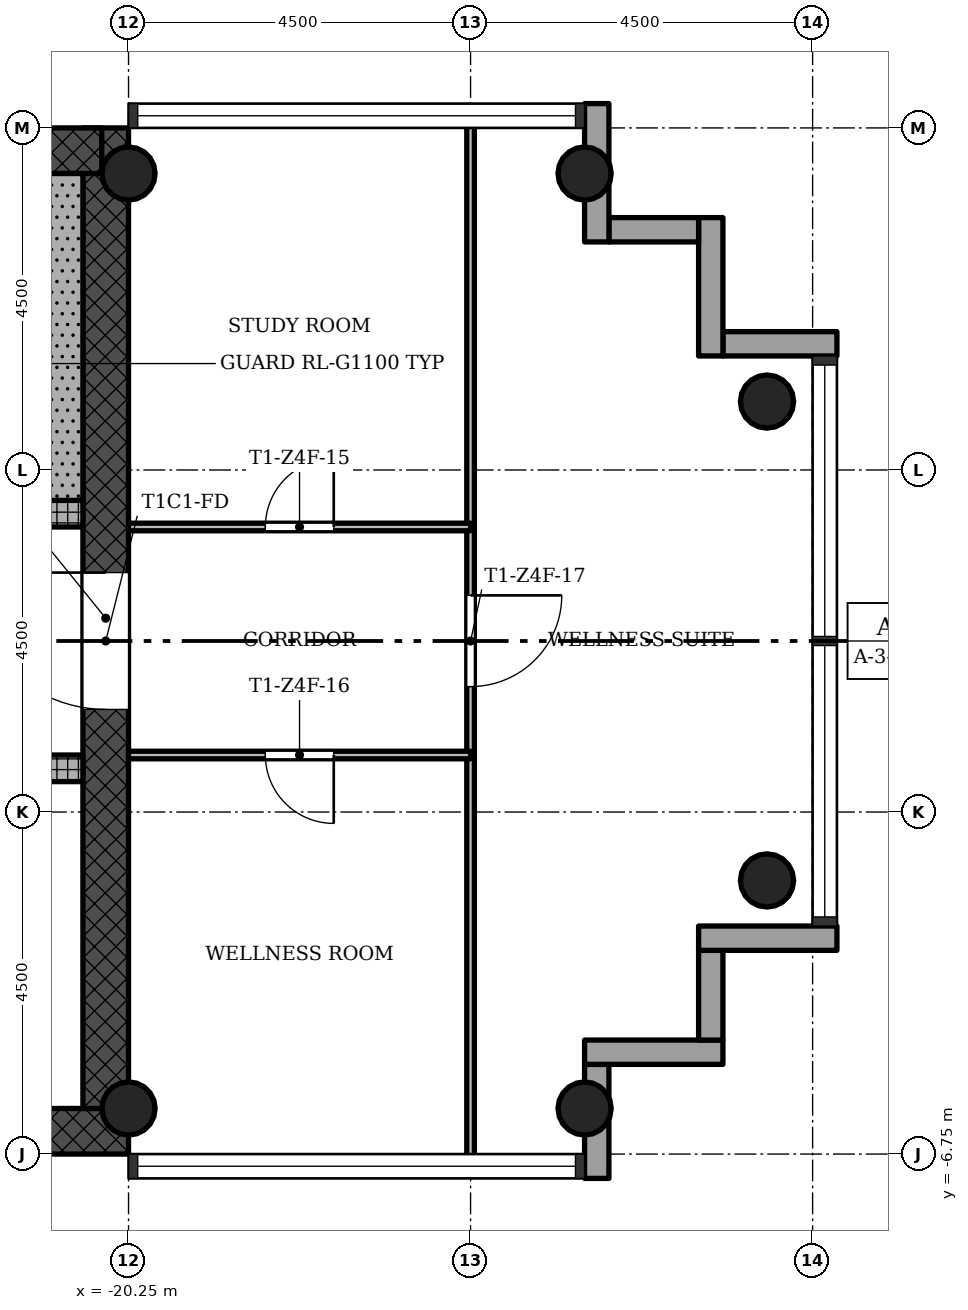
"""IFC4 building model, lengths in metres.
Left out: names, types, materials, properties, quantities, classifications, styles, units other than length and angle.
Written with IfcOpenShell. Run it as: python <this file> out.ifc"""

import sys

from ifc_helpers import new_model, si_unit, direction, frame, frame_2d, origin, origin_2d, place, context, subcontext, project, spatial, rectangle, hollow_circle, extrude, element, fill, save


model = new_model("IFC4")
c1 = context("Model", 3, precision=1e-05, world=origin(), true_north=direction((0.0, 1.0)))
c2 = subcontext(c1, "Body", "Model", "MODEL_VIEW")
j1 = project(units=[si_unit("LENGTHUNIT", "METRE"), si_unit("PLANEANGLEUNIT", "RADIAN")], contexts=[c1])
p1 = place(None, origin())
s1 = spatial("IfcSite", under=j1, at=p1, CompositionType="ELEMENT")
p2 = place(p1, origin())
s2 = spatial("IfcBuilding", under=s1, at=p2, CompositionType="ELEMENT")
p3 = place(p2, frame((0.0, 0.0, 219.8)))
s3 = spatial("IfcBuildingStorey", under=s2, at=p3, CompositionType="ELEMENT", Elevation=219.8)
p4 = place(p3, frame((-28.65, -6.45, 0.0), z_axis=(0.0, 0.0, 1.0), x_axis=(1.0, 0.0, 0.0)))
e1 = element("IfcWall", 1, at=p4, inside=s3, PredefinedType="SHEAR", context=c2, shape_type="SweptSolid", body=[
    extrude(rectangle(XDim=8.4, YDim=0.6, at=frame_2d((4.2, 0.0))), origin(), (0.0, 0.0, 1.0), 3.4),
])
p5 = place(p3, frame((-20.55, -6.15, 0.0), z_axis=(0.0, 0.0, 1.0), x_axis=(0.0, 1.0, 0.0)))
e2 = element("IfcWall", 2, at=p5, inside=s3, PredefinedType="SHEAR", context=c2, shape_type="SweptSolid", body=[
    extrude(rectangle(XDim=12.9, YDim=0.6, at=frame_2d((6.45, 0.0))), origin(), (0.0, 0.0, 1.0), 3.4),
])
p6 = place(p5, frame((5.25, 0.0, 0.0)))
e3 = element("IfcOpeningElement", 3, at=p6, cuts=e2, PredefinedType="OPENING", context=c2, shape_type="SweptSolid", body=[
    extrude(rectangle(XDim=1.8, YDim=2.1, at=frame_2d((0.9, 1.05))), frame((0.0, 0.31, 0.0), z_axis=(0.0, -1.0, 0.0), x_axis=(1.0, 0.0, 0.0)), (0.0, 0.0, 1.0), 0.62),
])
p7 = place(p3, frame((-20.602, 6.45, 0.0), z_axis=(0.0, 0.0, 1.0), x_axis=(-1.0, 0.0, 0.0)))
e4 = element("IfcWall", 4, at=p7, inside=s3, PredefinedType="SHEAR", context=c2, shape_type="SweptSolid", body=[
    extrude(rectangle(XDim=8.896, YDim=0.6, at=frame_2d((4.448, 0.0))), origin(), (0.0, 0.0, 1.0), 3.4),
])
p8 = place(p3, frame((-28.65, -1.675, 0.0), z_axis=(0.0, 0.0, 1.0), x_axis=(1.0, 0.0, 0.0)))
e5 = element("IfcWall", 5, at=p8, inside=s3, PredefinedType="SHEAR", context=c2, shape_type="SweptSolid", body=[
    extrude(rectangle(XDim=7.8, YDim=0.35, at=frame_2d((3.9, 0.0))), origin(), (0.0, 0.0, 1.0), 3.4),
])
p9 = place(p8, frame((1.15, 0.0, 0.0)))
e6 = element("IfcOpeningElement", 6, at=p9, cuts=e5, PredefinedType="OPENING", context=c2, shape_type="SweptSolid", body=[
    extrude(rectangle(XDim=1.1, YDim=2.1, at=frame_2d((0.55, 1.05))), frame((0.0, 0.185, 0.0), z_axis=(0.0, -1.0, 0.0), x_axis=(1.0, 0.0, 0.0)), (0.0, 0.0, 1.0), 0.37),
])
p10 = place(p8, frame((3.35, 0.0, 0.0)))
e7 = element("IfcOpeningElement", 7, at=p10, cuts=e5, PredefinedType="OPENING", context=c2, shape_type="SweptSolid", body=[
    extrude(rectangle(XDim=1.1, YDim=2.1, at=frame_2d((0.55, 1.05))), frame((0.0, 0.185, 0.0), z_axis=(0.0, -1.0, 0.0), x_axis=(1.0, 0.0, 0.0)), (0.0, 0.0, 1.0), 0.37),
])
p11 = place(p8, frame((5.55, 0.0, 0.0)))
e8 = element("IfcOpeningElement", 8, at=p11, cuts=e5, PredefinedType="OPENING", context=c2, shape_type="SweptSolid", body=[
    extrude(rectangle(XDim=1.1, YDim=2.1, at=frame_2d((0.55, 1.05))), frame((0.0, 0.185, 0.0), z_axis=(0.0, -1.0, 0.0), x_axis=(1.0, 0.0, 0.0)), (0.0, 0.0, 1.0), 0.37),
])
p12 = place(p3, frame((-28.65, 1.675, 0.0), z_axis=(0.0, 0.0, 1.0), x_axis=(1.0, 0.0, 0.0)))
e9 = element("IfcWall", 9, at=p12, inside=s3, PredefinedType="SHEAR", context=c2, shape_type="SweptSolid", body=[
    extrude(rectangle(XDim=7.8, YDim=0.35, at=frame_2d((3.9, 0.0))), origin(), (0.0, 0.0, 1.0), 3.4),
])
p13 = place(p12, frame((1.05, 0.0, 0.0)))
e10 = element("IfcOpeningElement", 10, at=p13, cuts=e9, PredefinedType="OPENING", context=c2, shape_type="SweptSolid", body=[
    extrude(rectangle(XDim=0.9, YDim=2.1, at=frame_2d((0.45, 1.05))), frame((0.0, 0.185, 0.0), z_axis=(0.0, -1.0, 0.0), x_axis=(1.0, 0.0, 0.0)), (0.0, 0.0, 1.0), 0.37),
])
for number, where, z_axis, x_axis in (
    (11, (-20.25, -6.15, 0.0), (0.0, 0.0, 1.0), (1.0, 0.0, 0.0)),
    (12, (-20.25, 6.15, 0.0), (0.0, 0.0, 1.0), (1.0, 0.0, 0.0)),
    (13, (-14.25, -6.15, 0.0), (0.0, 0.0, 1.0), (1.0, 0.0, 0.0)),
    (14, (-14.25, 6.15, 0.0), (0.0, 0.0, 1.0), (1.0, 0.0, 0.0)),
    (15, (-11.85, -3.15, 0.0), (0.0, 0.0, 1.0), (1.0, 0.0, 0.0)),
    (16, (-11.85, 3.15, 0.0), (0.0, 0.0, 1.0), (1.0, 0.0, 0.0)),
):
    element("IfcColumn", number, at=place(p3, frame(where, z_axis=z_axis, x_axis=x_axis)), inside=s3, PredefinedType="COLUMN", context=c2, shape_type="SweptSolid", body=[
        extrude(hollow_circle(Radius=0.35, WallThickness=0.025, at=origin_2d()), origin(), (0.0, 0.0, 1.0), 3.4),
    ])
p14 = place(p3, frame((-14.09, -7.07, -0.3), z_axis=(0.0, 0.0, 1.0), x_axis=(0.0, 1.0, 0.0)))
e17 = element("IfcWall", 17, at=p14, inside=s3, PredefinedType="STANDARD", context=c2, shape_type="SweptSolid", body=[
    extrude(rectangle(XDim=1.5, YDim=0.32, at=frame_2d((0.75, 0.0))), origin(), (0.0, 0.0, 1.0), 3.4),
])
p15 = place(p3, frame((-14.25, -5.41, -0.3), z_axis=(0.0, 0.0, 1.0), x_axis=(1.0, 0.0, 0.0)))
e18 = element("IfcWall", 18, at=p15, inside=s3, PredefinedType="STANDARD", context=c2, shape_type="SweptSolid", body=[
    extrude(rectangle(XDim=1.82, YDim=0.32, at=frame_2d((0.91, 0.0))), origin(), (0.0, 0.0, 1.0), 3.4),
])
p16 = place(p3, frame((-12.59, -5.25, -0.3), z_axis=(0.0, 0.0, 1.0), x_axis=(0.0, 1.0, 0.0)))
e19 = element("IfcWall", 19, at=p16, inside=s3, PredefinedType="STANDARD", context=c2, shape_type="SweptSolid", body=[
    extrude(rectangle(XDim=1.18, YDim=0.32, at=frame_2d((0.59, 0.0))), origin(), (0.0, 0.0, 1.0), 3.4),
])
p17 = place(p3, frame((-12.75, -3.91, -0.3), z_axis=(0.0, 0.0, 1.0), x_axis=(1.0, 0.0, 0.0)))
e20 = element("IfcWall", 20, at=p17, inside=s3, PredefinedType="STANDARD", context=c2, shape_type="SweptSolid", body=[
    extrude(rectangle(XDim=1.82, YDim=0.32, at=frame_2d((0.91, 0.0))), origin(), (0.0, 0.0, 1.0), 3.4),
])
p18 = place(p3, frame((-10.93, 3.91, -0.3), z_axis=(0.0, 0.0, 1.0), x_axis=(-1.0, 0.0, 0.0)))
e21 = element("IfcWall", 21, at=p18, inside=s3, PredefinedType="STANDARD", context=c2, shape_type="SweptSolid", body=[
    extrude(rectangle(XDim=1.5, YDim=0.32, at=frame_2d((0.75, 0.0))), origin(), (0.0, 0.0, 1.0), 3.4),
])
p19 = place(p3, frame((-12.59, 3.75, -0.3), z_axis=(0.0, 0.0, 1.0), x_axis=(0.0, 1.0, 0.0)))
e22 = element("IfcWall", 22, at=p19, inside=s3, PredefinedType="STANDARD", context=c2, shape_type="SweptSolid", body=[
    extrude(rectangle(XDim=1.82, YDim=0.32, at=frame_2d((0.91, 0.0))), origin(), (0.0, 0.0, 1.0), 3.4),
])
p20 = place(p3, frame((-12.75, 5.41, -0.3), z_axis=(0.0, 0.0, 1.0), x_axis=(-1.0, 0.0, 0.0)))
e23 = element("IfcWall", 23, at=p20, inside=s3, PredefinedType="STANDARD", context=c2, shape_type="SweptSolid", body=[
    extrude(rectangle(XDim=1.18, YDim=0.32, at=frame_2d((0.59, 0.0))), origin(), (0.0, 0.0, 1.0), 3.4),
])
p21 = place(p3, frame((-14.09, 5.25, -0.3), z_axis=(0.0, 0.0, 1.0), x_axis=(0.0, 1.0, 0.0)))
e24 = element("IfcWall", 24, at=p21, inside=s3, PredefinedType="STANDARD", context=c2, shape_type="SweptSolid", body=[
    extrude(rectangle(XDim=1.82, YDim=0.32, at=frame_2d((0.91, 0.0))), origin(), (0.0, 0.0, 1.0), 3.4),
])
p22 = place(p3, frame((-15.75, -6.85, 0.0), z_axis=(0.0, 0.0, 1.0), x_axis=(0.0, 1.0, 0.0)))
e25 = element("IfcWall", 25, at=p22, inside=s3, PredefinedType="PARTITIONING", context=c2, shape_type="SweptSolid", body=[
    extrude(rectangle(XDim=13.7, YDim=0.1, at=frame_2d((6.85, 0.0))), origin(), (0.0, 0.0, 1.0), 3.0),
])
p23 = place(p22, frame((6.25, 0.0, 0.0)))
e26 = element("IfcOpeningElement", 26, at=p23, cuts=e25, PredefinedType="OPENING", context=c2, shape_type="SweptSolid", body=[
    extrude(rectangle(XDim=1.2, YDim=2.1, at=frame_2d((0.6, 1.05))), frame((0.0, 0.06, 0.0), z_axis=(0.0, -1.0, 0.0), x_axis=(1.0, 0.0, 0.0)), (0.0, 0.0, 1.0), 0.12),
])
p24 = place(p3, frame((-20.25, -1.5, 0.0), z_axis=(0.0, 0.0, 1.0), x_axis=(1.0, 0.0, 0.0)))
e27 = element("IfcWall", 27, at=p24, inside=s3, PredefinedType="PARTITIONING", context=c2, shape_type="SweptSolid", body=[
    extrude(rectangle(XDim=4.5, YDim=0.1, at=frame_2d((2.25, 0.0))), origin(), (0.0, 0.0, 1.0), 3.0),
])
p25 = place(p24, frame((1.8, 0.0, 0.0)))
e28 = element("IfcOpeningElement", 28, at=p25, cuts=e27, PredefinedType="OPENING", context=c2, shape_type="SweptSolid", body=[
    extrude(rectangle(XDim=0.9, YDim=2.1, at=frame_2d((0.45, 1.05))), frame((0.0, 0.06, 0.0), z_axis=(0.0, -1.0, 0.0), x_axis=(1.0, 0.0, 0.0)), (0.0, 0.0, 1.0), 0.12),
])
p26 = place(p3, frame((-20.25, 1.5, 0.0), z_axis=(0.0, 0.0, 1.0), x_axis=(1.0, 0.0, 0.0)))
e29 = element("IfcWall", 29, at=p26, inside=s3, PredefinedType="PARTITIONING", context=c2, shape_type="SweptSolid", body=[
    extrude(rectangle(XDim=4.5, YDim=0.1, at=frame_2d((2.25, 0.0))), origin(), (0.0, 0.0, 1.0), 3.0),
])
p27 = place(p26, frame((1.8, 0.0, 0.0)))
e30 = element("IfcOpeningElement", 30, at=p27, cuts=e29, PredefinedType="OPENING", context=c2, shape_type="SweptSolid", body=[
    extrude(rectangle(XDim=0.9, YDim=2.1, at=frame_2d((0.45, 1.05))), frame((0.0, 0.06, 0.0), z_axis=(0.0, -1.0, 0.0), x_axis=(1.0, 0.0, 0.0)), (0.0, 0.0, 1.0), 0.12),
])
p28 = place(p3, frame((-21.15, 1.85, 0.0), z_axis=(0.0, 0.0, 1.0), x_axis=(0.0, 1.0, 0.0)))
e31 = element("IfcWall", 31, at=p28, inside=s3, PredefinedType="SHEAR", context=c2, shape_type="SweptSolid", body=[
    extrude(rectangle(XDim=4.3, YDim=0.6, at=frame_2d((2.15, 0.0))), origin(), (0.0, 0.0, 1.0), 3.4),
])
p29 = place(p27, origin())
e32 = element("IfcDoor", 32, at=p29, inside=s3, OperationType="SINGLE_SWING_LEFT", PredefinedType="DOOR", context=c2, shape_type="SweptSolid", body=[
    extrude(rectangle(XDim=0.9, YDim=2.1, at=frame_2d((0.45, 1.05))), frame((0.0, 0.025, 0.0), z_axis=(0.0, -1.0, 0.0), x_axis=(1.0, 0.0, 0.0)), (0.0, 0.0, 1.0), 0.05),
])
fill(e30, e32)
p30 = place(p25, origin())
e33 = element("IfcDoor", 33, at=p30, inside=s3, OperationType="SINGLE_SWING_RIGHT", PredefinedType="DOOR", context=c2, shape_type="SweptSolid", body=[
    extrude(rectangle(XDim=0.9, YDim=2.1, at=frame_2d((0.45, 1.05))), frame((0.0, 0.025, 0.0), z_axis=(0.0, -1.0, 0.0), x_axis=(1.0, 0.0, 0.0)), (0.0, 0.0, 1.0), 0.05),
])
fill(e28, e33)
p31 = place(p23, origin())
e34 = element("IfcDoor", 34, at=p31, inside=s3, OperationType="SINGLE_SWING_RIGHT", PredefinedType="DOOR", context=c2, shape_type="SweptSolid", body=[
    extrude(rectangle(XDim=1.2, YDim=2.1, at=frame_2d((0.6, 1.05))), frame((0.0, 0.025, 0.0), z_axis=(0.0, -1.0, 0.0), x_axis=(1.0, 0.0, 0.0)), (0.0, 0.0, 1.0), 0.05),
])
fill(e26, e34)
p32 = place(p6, origin())
e35 = element("IfcDoor", 35, at=p32, inside=s3, OperationType="SINGLE_SWING_LEFT", PredefinedType="DOOR", context=c2, shape_type="SweptSolid", body=[
    extrude(rectangle(XDim=1.8, YDim=2.1, at=frame_2d((0.9, 1.05))), frame((0.0, 0.025, 0.0), z_axis=(0.0, -1.0, 0.0), x_axis=(1.0, 0.0, 0.0)), (0.0, 0.0, 1.0), 0.05),
])
fill(e3, e35)
save(model, sys.argv[1])
